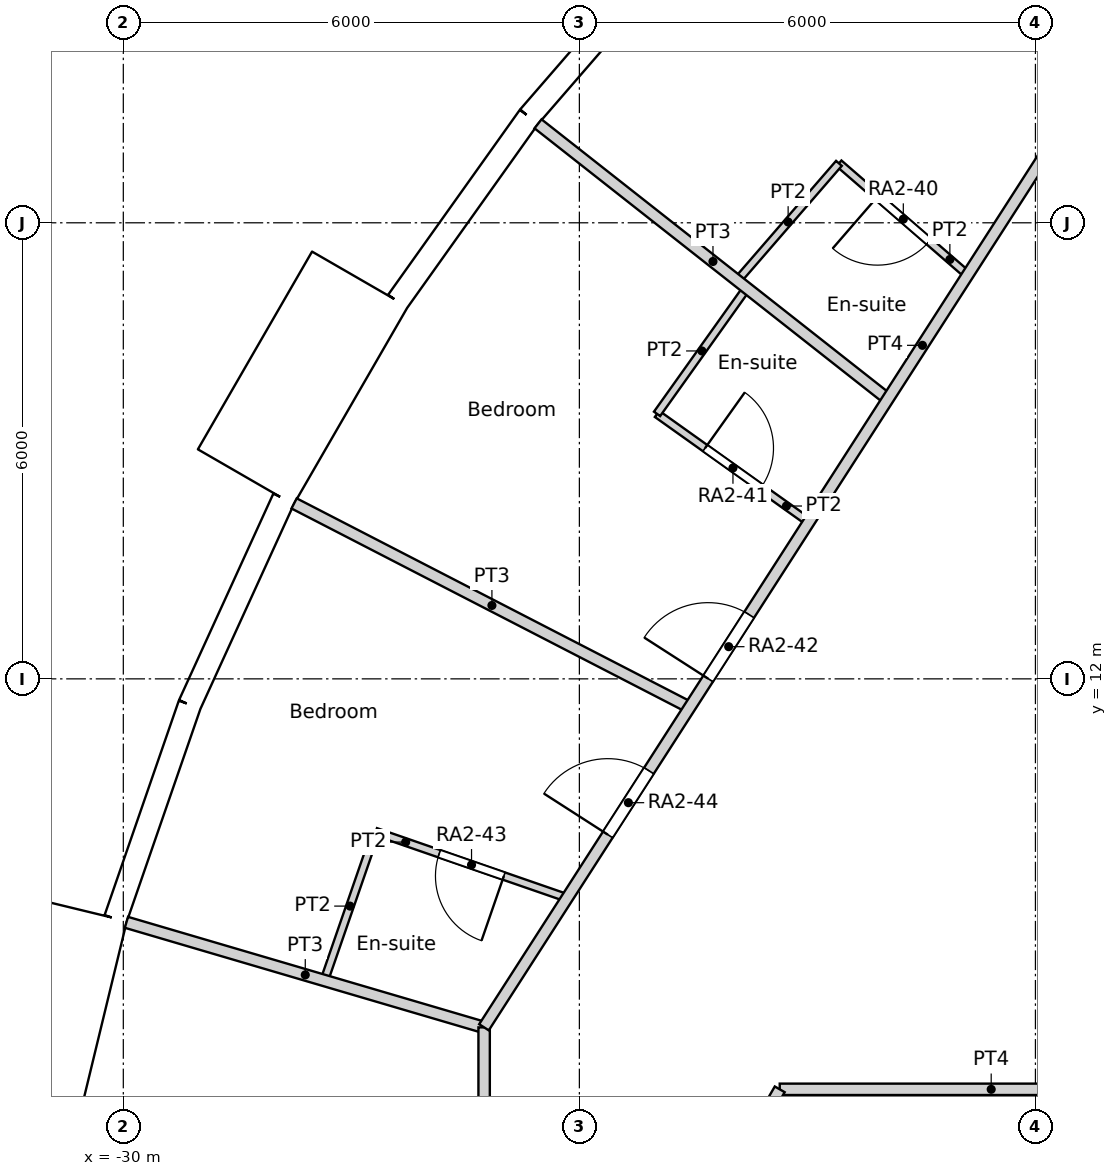
"""IFC4 building model, lengths in metres.
Left out: names, types, materials, properties, quantities, classifications, styles, units other than length and angle.
Written with IfcOpenShell. Run it as: python <this file> out.ifc"""

import sys

from ifc_helpers import new_model, si_unit, direction, frame, frame_2d, origin, origin_2d, place, context, subcontext, project, spatial, rectangle, circle, extrude, element, fill, save


model = new_model("IFC4")
c1 = context("Model", 3, precision=1e-05, world=origin(), true_north=direction((0.0, 1.0)))
c2 = subcontext(c1, "Body", "Model", "MODEL_VIEW")
j1 = project(units=[si_unit("LENGTHUNIT", "METRE"), si_unit("PLANEANGLEUNIT", "RADIAN")], contexts=[c1])
p1 = place(None, origin())
s1 = spatial("IfcSite", under=j1, at=p1, CompositionType="ELEMENT")
p2 = place(p1, origin())
s2 = spatial("IfcBuilding", under=s1, at=p2, CompositionType="ELEMENT")
p3 = place(p2, frame((0.0, 0.0, 39.0)))
s3 = spatial("IfcBuildingStorey", under=s2, at=p3, CompositionType="ELEMENT", Elevation=39.0)
for number, where, z_axis, x_axis in (
    (1, (-23.797, 18.715, 0.0), (0.0, 0.0, 1.0), (1.0, 0.0, 0.0)),
    (2, (-26.909, 13.873, 0.0), (0.0, 0.0, 1.0), (1.0, 0.0, 0.0)),
    (3, (-29.048, 8.529, 0.0), (0.0, 0.0, 1.0), (1.0, 0.0, 0.0)),
):
    element("IfcColumn", number, at=place(p3, frame(where, z_axis=z_axis, x_axis=x_axis)), inside=s3, PredefinedType="COLUMN", context=c2, shape_type="SweptSolid", body=[
        extrude(circle(Radius=0.7, at=origin_2d()), origin(), (0.0, 0.0, 1.0), 3.6),
    ])
for number, where, z_axis, x_axis in (
    (4, (-20.509, 13.489, 0.0), (0.0, 0.0, 1.0), (1.0, 0.0, 0.0)),
    (5, (-23.067, 8.396, 0.0), (0.0, 0.0, 1.0), (1.0, 0.0, 0.0)),
):
    element("IfcColumn", number, at=place(p3, frame(where, z_axis=z_axis, x_axis=x_axis)), inside=s3, PredefinedType="COLUMN", context=c2, shape_type="SweptSolid", body=[
        extrude(circle(Radius=0.75, at=origin_2d()), origin(), (0.0, 0.0, 1.0), 3.6),
    ])
p4 = place(p3, frame((-22.711, 21.646, 0.0), z_axis=(0.0, 0.0, 1.0), x_axis=(-0.654830712471, -0.755775587066, 0.0)))
e6 = element("IfcWall", 6, at=p4, inside=s3, PredefinedType="SOLIDWALL", context=c2, shape_type="SweptSolid", body=[
    extrude(rectangle(XDim=2.98, YDim=0.3, at=frame_2d((1.49, 0.0))), origin(), (0.0, 0.0, 1.0), 3.15),
])
p5 = place(p4, frame((1.49, 0.0, 1.55)))
e7 = element("IfcOpeningElement", 7, at=p5, cuts=e6, PredefinedType="OPENING", context=c2, shape_type="SweptSolid", body=[
    extrude(circle(Radius=0.9, at=origin_2d()), frame((0.0, 0.16, 0.0), z_axis=(0.0, -1.0, 0.0), x_axis=(1.0, 0.0, 0.0)), (0.0, 0.0, 1.0), 0.32),
])
p6 = place(p3, frame((-24.662, 19.394, 0.0), z_axis=(0.0, 0.0, 1.0), x_axis=(-0.580113774115, -0.814535456, 0.0)))
e8 = element("IfcWall", 8, at=p6, inside=s3, PredefinedType="SOLIDWALL", context=c2, shape_type="SweptSolid", body=[
    extrude(rectangle(XDim=2.98, YDim=0.3, at=frame_2d((1.49, 0.0))), origin(), (0.0, 0.0, 1.0), 3.15),
])
p7 = place(p6, frame((1.49, 0.0, 1.55)))
e9 = element("IfcOpeningElement", 9, at=p7, cuts=e8, PredefinedType="OPENING", context=c2, shape_type="SweptSolid", body=[
    extrude(circle(Radius=0.9, at=origin_2d()), frame((0.0, 0.16, 0.0), z_axis=(0.0, -1.0, 0.0), x_axis=(1.0, 0.0, 0.0)), (0.0, 0.0, 1.0), 0.32),
])
p8 = place(p3, frame((-26.888, 17.256, -0.45), z_axis=(0.0, 0.0, 1.0), x_axis=(-0.499990139034, -0.866031096941, 0.0)))
e10 = element("IfcWall", 10, at=p8, inside=s3, PredefinedType="ELEMENTEDWALL", context=c2, shape_type="SweptSolid", body=[
    extrude(rectangle(XDim=3.0, YDim=1.45, at=frame_2d((1.5, 0.0))), origin(), (0.0, 0.0, 1.0), 3.6),
])
p9 = place(p8, frame((1.5, 0.0, 2.0)))
e11 = element("IfcOpeningElement", 11, at=p9, cuts=e10, PredefinedType="OPENING", context=c2, shape_type="SweptSolid", body=[
    extrude(circle(Radius=0.9, at=origin_2d()), frame((0.0, 0.735, 0.0), z_axis=(0.0, -1.0, 0.0), x_axis=(1.0, 0.0, 0.0)), (0.0, 0.0, 1.0), 1.47),
])
p10 = place(p3, frame((-27.889, 14.371, 0.0), z_axis=(0.0, 0.0, 1.0), x_axis=(-0.415407317162, -0.909635509888, 0.0)))
e12 = element("IfcWall", 12, at=p10, inside=s3, PredefinedType="SOLIDWALL", context=c2, shape_type="SweptSolid", body=[
    extrude(rectangle(XDim=2.98, YDim=0.3, at=frame_2d((1.49, 0.0))), origin(), (0.0, 0.0, 1.0), 3.15),
])
p11 = place(p10, frame((1.49, 0.0, 1.55)))
e13 = element("IfcOpeningElement", 13, at=p11, cuts=e12, PredefinedType="OPENING", context=c2, shape_type="SweptSolid", body=[
    extrude(circle(Radius=0.9, at=origin_2d()), frame((0.0, 0.16, 0.0), z_axis=(0.0, -1.0, 0.0), x_axis=(1.0, 0.0, 0.0)), (0.0, 0.0, 1.0), 0.32),
])
p12 = place(p3, frame((-29.127, 11.661, 0.0), z_axis=(0.0, 0.0, 1.0), x_axis=(-0.327096492592, -0.944990944154, 0.0)))
e14 = element("IfcWall", 14, at=p12, inside=s3, PredefinedType="SOLIDWALL", context=c2, shape_type="SweptSolid", body=[
    extrude(rectangle(XDim=2.979, YDim=0.3, at=frame_2d((1.49, 0.0))), origin(), (0.0, 0.0, 1.0), 3.15),
])
p13 = place(p12, frame((1.49, 0.0, 1.55)))
e15 = element("IfcOpeningElement", 15, at=p13, cuts=e14, PredefinedType="OPENING", context=c2, shape_type="SweptSolid", body=[
    extrude(circle(Radius=0.9, at=origin_2d()), frame((0.0, 0.16, 0.0), z_axis=(0.0, -1.0, 0.0), x_axis=(1.0, 0.0, 0.0)), (0.0, 0.0, 1.0), 0.32),
])
p14 = place(p3, frame((-30.661, 8.982, -0.45), z_axis=(0.0, 0.0, 1.0), x_axis=(-0.235751415068, -0.971813392732, 0.0)))
e16 = element("IfcWall", 16, at=p14, inside=s3, PredefinedType="ELEMENTEDWALL", context=c2, shape_type="SweptSolid", body=[
    extrude(rectangle(XDim=3.0, YDim=1.45, at=frame_2d((1.5, 0.0))), origin(), (0.0, 0.0, 1.0), 3.6),
])
p15 = place(p14, frame((1.5, 0.0, 2.0)))
e17 = element("IfcOpeningElement", 17, at=p15, cuts=e16, PredefinedType="OPENING", context=c2, shape_type="SweptSolid", body=[
    extrude(circle(Radius=0.9, at=origin_2d()), frame((0.0, 0.735, 0.0), z_axis=(0.0, -1.0, 0.0), x_axis=(1.0, 0.0, 0.0)), (0.0, 0.0, 1.0), 1.47),
])
p16 = place(p3, frame((-25.255, 7.416, 0.0), z_axis=(0.0, 0.0, 1.0), x_axis=(0.540805851332, 0.841147449123, 0.0)))
e18 = element("IfcWall", 18, at=p16, inside=s3, PredefinedType="PARTITIONING", context=c2, shape_type="SweptSolid", body=[
    extrude(rectangle(XDim=14.829, YDim=0.15, at=frame_2d((7.415, 0.0))), origin(), (0.0, 0.0, 1.0), 3.15),
])
p17 = place(p16, frame((5.453, 0.0, 0.0)))
e19 = element("IfcOpeningElement", 19, at=p17, cuts=e18, PredefinedType="OPENING", context=c2, shape_type="SweptSolid", body=[
    extrude(rectangle(XDim=1.0, YDim=2.1, at=frame_2d((0.5, 1.05))), frame((0.0, 0.075, 0.0), z_axis=(0.0, -1.0, 0.0), x_axis=(1.0, 0.0, 0.0)), (0.0, 0.0, 1.0), 0.15),
])
p18 = place(p16, frame((3.013, 0.0, 0.0)))
e20 = element("IfcOpeningElement", 20, at=p18, cuts=e18, PredefinedType="OPENING", context=c2, shape_type="SweptSolid", body=[
    extrude(rectangle(XDim=1.0, YDim=2.1, at=frame_2d((0.5, 1.05))), frame((0.0, 0.075, 0.0), z_axis=(0.0, -1.0, 0.0), x_axis=(1.0, 0.0, 0.0)), (0.0, 0.0, 1.0), 0.15),
])
p19 = place(p3, frame((-21.364, 6.6, 0.0), z_axis=(0.0, 0.0, 1.0), x_axis=(1.0, 0.0, 0.0)))
e21 = element("IfcWall", 21, at=p19, inside=s3, PredefinedType="PARTITIONING", context=c2, shape_type="SweptSolid", body=[
    extrude(rectangle(XDim=5.564, YDim=0.15, at=frame_2d((2.782, 0.0))), origin(), (0.0, 0.0, 1.0), 3.15),
])
p20 = place(p3, frame((-21.802, 5.842, 0.0), z_axis=(0.0, 0.0, 1.0), x_axis=(0.500277597875, 0.865865073245, 0.0)))
e22 = element("IfcWall", 22, at=p20, inside=s3, PredefinedType="PARTITIONING", context=c2, shape_type="SweptSolid", body=[
    extrude(rectangle(XDim=0.875, YDim=0.15, at=frame_2d((0.438, 0.0))), origin(), (0.0, 0.0, 1.0), 3.15),
])
p21 = place(p3, frame((-25.253, -7.415, 0.0), z_axis=(0.0, 0.0, 1.0), x_axis=(0.0, 1.0, 0.0)))
e23 = element("IfcWall", 23, at=p21, inside=s3, PredefinedType="PARTITIONING", context=c2, shape_type="SweptSolid", body=[
    extrude(rectangle(XDim=14.83, YDim=0.15, at=frame_2d((7.415, 0.0))), origin(), (0.0, 0.0, 1.0), 3.15),
])
p22 = place(p21, frame((8.165, 0.0, 0.0)))
e24 = element("IfcOpeningElement", 24, at=p22, cuts=e23, PredefinedType="OPENING", context=c2, shape_type="SweptSolid", body=[
    extrude(rectangle(XDim=1.0, YDim=2.04, at=frame_2d((0.5, 1.02))), frame((0.0, 0.075, 0.0), z_axis=(0.0, -1.0, 0.0), x_axis=(1.0, 0.0, 0.0)), (0.0, 0.0, 1.0), 0.15),
])
p23 = place(p21, frame((2.004, 0.0, 0.0)))
e25 = element("IfcOpeningElement", 25, at=p23, cuts=e23, PredefinedType="OPENING", context=c2, shape_type="SweptSolid", body=[
    extrude(rectangle(XDim=1.0, YDim=2.04, at=frame_2d((0.5, 1.02))), frame((0.0, 0.075, 0.0), z_axis=(0.0, -1.0, 0.0), x_axis=(1.0, 0.0, 0.0)), (0.0, 0.0, 1.0), 0.15),
])
p24 = place(p3, frame((-20.448, 23.598, 0.0), z_axis=(0.0, 0.0, 1.0), x_axis=(0.654847179409, -0.755761319214, 0.0)))
e26 = element("IfcWall", 26, at=p24, inside=s3, PredefinedType="PARTITIONING", context=c2, shape_type="SweptSolid", body=[
    extrude(rectangle(XDim=4.906, YDim=0.1, at=frame_2d((2.453, 0.0))), origin(), (0.0, 0.0, 1.0), 3.15),
])
p25 = place(p24, frame((2.272, 0.0, 0.0)))
e27 = element("IfcOpeningElement", 27, at=p25, cuts=e26, PredefinedType="OPENING", context=c2, shape_type="SweptSolid", body=[
    extrude(rectangle(XDim=0.9, YDim=2.1, at=frame_2d((0.45, 1.05))), frame((0.0, 0.05, 0.0), z_axis=(0.0, -1.0, 0.0), x_axis=(1.0, 0.0, 0.0)), (0.0, 0.0, 1.0), 0.1),
])
p26 = place(p3, frame((-20.585, 18.782, 0.0), z_axis=(0.0, 0.0, 1.0), x_axis=(0.755685488978, -0.6549346851, 0.0)))
e28 = element("IfcWall", 28, at=p26, inside=s3, PredefinedType="PARTITIONING", context=c2, shape_type="SweptSolid", body=[
    extrude(rectangle(XDim=2.241, YDim=0.1, at=frame_2d((1.121, 0.0))), origin(), (0.0, 0.0, 1.0), 3.15),
])
p27 = place(p26, frame((0.671, 0.0, 0.0)))
e29 = element("IfcOpeningElement", 29, at=p27, cuts=e28, PredefinedType="OPENING", context=c2, shape_type="SweptSolid", body=[
    extrude(rectangle(XDim=0.9, YDim=2.04, at=frame_2d((0.45, 1.02))), frame((0.0, 0.05, 0.0), z_axis=(0.0, -1.0, 0.0), x_axis=(1.0, 0.0, 0.0)), (0.0, 0.0, 1.0), 0.1),
])
p28 = place(p3, frame((-21.922, 17.239, 0.0), z_axis=(0.0, 0.0, 1.0), x_axis=(0.654907776539, 0.755708809152, 0.0)))
e30 = element("IfcWall", 30, at=p28, inside=s3, PredefinedType="PARTITIONING", context=c2, shape_type="SweptSolid", body=[
    extrude(rectangle(XDim=2.042, YDim=0.1, at=frame_2d((1.021, 0.0))), origin(), (0.0, 0.0, 1.0), 3.15),
])
p29 = place(p3, frame((-24.544, 19.302, 0.0), z_axis=(0.0, 0.0, 1.0), x_axis=(0.785905950196, -0.618346049916, 0.0)))
e31 = element("IfcWall", 31, at=p29, inside=s3, PredefinedType="PARTITIONING", context=c2, shape_type="SweptSolid", body=[
    extrude(rectangle(XDim=5.857, YDim=0.15, at=frame_2d((2.929, 0.0))), origin(), (0.0, 0.0, 1.0), 3.15),
])
p30 = place(p3, frame((-22.978, 15.486, 0.0), z_axis=(0.0, 0.0, 1.0), x_axis=(0.580283748447, 0.814414373208, 0.0)))
e32 = element("IfcWall", 32, at=p30, inside=s3, PredefinedType="PARTITIONING", context=c2, shape_type="SweptSolid", body=[
    extrude(rectangle(XDim=2.033, YDim=0.1, at=frame_2d((1.017, 0.0))), origin(), (0.0, 0.0, 1.0), 3.15),
])
p31 = place(p3, frame((-22.978, 15.486, 0.0), z_axis=(0.0, 0.0, 1.0), x_axis=(0.814519517834, -0.580136152181, 0.0)))
e33 = element("IfcWall", 33, at=p31, inside=s3, PredefinedType="PARTITIONING", context=c2, shape_type="SweptSolid", body=[
    extrude(rectangle(XDim=2.453, YDim=0.1, at=frame_2d((1.227, 0.0))), origin(), (0.0, 0.0, 1.0), 3.15),
])
p32 = place(p31, frame((0.776, 0.0, 0.0)))
e34 = element("IfcOpeningElement", 34, at=p32, cuts=e33, PredefinedType="OPENING", context=c2, shape_type="SweptSolid", body=[
    extrude(rectangle(XDim=0.9, YDim=2.04, at=frame_2d((0.45, 1.02))), frame((0.0, 0.05, 0.0), z_axis=(0.0, -1.0, 0.0), x_axis=(1.0, 0.0, 0.0)), (0.0, 0.0, 1.0), 0.1),
])
p33 = place(p3, frame((-27.753, 14.308, 0.0), z_axis=(0.0, 0.0, 1.0), x_axis=(0.88877955153, -0.45833493079, 0.0)))
e35 = element("IfcWall", 35, at=p33, inside=s3, PredefinedType="PARTITIONING", context=c2, shape_type="SweptSolid", body=[
    extrude(rectangle(XDim=5.856, YDim=0.15, at=frame_2d((2.928, 0.0))), origin(), (0.0, 0.0, 1.0), 3.15),
])
p34 = place(p3, frame((-26.679, 9.989, 0.0), z_axis=(0.0, 0.0, 1.0), x_axis=(0.945014370431, -0.327028805578, 0.0)))
e36 = element("IfcWall", 36, at=p34, inside=s3, PredefinedType="PARTITIONING", context=c2, shape_type="SweptSolid", body=[
    extrude(rectangle(XDim=2.667, YDim=0.1, at=frame_2d((1.333, 0.0))), origin(), (0.0, 0.0, 1.0), 3.15),
])
p35 = place(p34, frame((0.884, 0.0, 0.0)))
e37 = element("IfcOpeningElement", 37, at=p35, cuts=e36, PredefinedType="OPENING", context=c2, shape_type="SweptSolid", body=[
    extrude(rectangle(XDim=0.9, YDim=2.04, at=frame_2d((0.45, 1.02))), frame((0.0, 0.05, 0.0), z_axis=(0.0, -1.0, 0.0), x_axis=(1.0, 0.0, 0.0)), (0.0, 0.0, 1.0), 0.1),
])
p36 = place(p3, frame((-27.356, 8.032, 0.0), z_axis=(0.0, 0.0, 1.0), x_axis=(0.326924291943, 0.945050531632, 0.0)))
e38 = element("IfcWall", 38, at=p36, inside=s3, PredefinedType="PARTITIONING", context=c2, shape_type="SweptSolid", body=[
    extrude(rectangle(XDim=2.071, YDim=0.1, at=frame_2d((1.035, 0.0))), origin(), (0.0, 0.0, 1.0), 3.15),
])
p37 = place(p3, frame((-29.959, 8.797, 0.0), z_axis=(0.0, 0.0, 1.0), x_axis=(0.95941700717, -0.281991145876, 0.0)))
e39 = element("IfcWall", 39, at=p37, inside=s3, PredefinedType="PARTITIONING", context=c2, shape_type="SweptSolid", body=[
    extrude(rectangle(XDim=4.905, YDim=0.15, at=frame_2d((2.452, 0.0))), origin(), (0.0, 0.0, 1.0), 3.15),
])
p38 = place(p5, origin())
e40 = element("IfcWindow", 40, at=p38, inside=s3, PartitioningType="SINGLE_PANEL", PredefinedType="WINDOW", context=c2, shape_type="SweptSolid", body=[
    extrude(circle(Radius=0.9, at=origin_2d()), frame((0.0, 0.12, 0.0), z_axis=(0.0, -1.0, 0.0), x_axis=(1.0, 0.0, 0.0)), (0.0, 0.0, 1.0), 0.1),
])
fill(e7, e40)
p39 = place(p7, origin())
e41 = element("IfcWindow", 41, at=p39, inside=s3, PartitioningType="SINGLE_PANEL", PredefinedType="WINDOW", context=c2, shape_type="SweptSolid", body=[
    extrude(circle(Radius=0.9, at=origin_2d()), frame((0.0, 0.12, 0.0), z_axis=(0.0, -1.0, 0.0), x_axis=(1.0, 0.0, 0.0)), (0.0, 0.0, 1.0), 0.1),
])
fill(e9, e41)
p40 = place(p9, origin())
e42 = element("IfcWindow", 42, at=p40, inside=s3, PartitioningType="SINGLE_PANEL", PredefinedType="WINDOW", context=c2, shape_type="SweptSolid", body=[
    extrude(circle(Radius=0.9, at=origin_2d()), frame((0.0, 0.695, 0.0), z_axis=(0.0, -1.0, 0.0), x_axis=(1.0, 0.0, 0.0)), (0.0, 0.0, 1.0), 0.1),
])
fill(e11, e42)
p41 = place(p11, origin())
e43 = element("IfcWindow", 43, at=p41, inside=s3, PartitioningType="SINGLE_PANEL", PredefinedType="WINDOW", context=c2, shape_type="SweptSolid", body=[
    extrude(circle(Radius=0.9, at=origin_2d()), frame((0.0, 0.12, 0.0), z_axis=(0.0, -1.0, 0.0), x_axis=(1.0, 0.0, 0.0)), (0.0, 0.0, 1.0), 0.1),
])
fill(e13, e43)
p42 = place(p13, origin())
e44 = element("IfcWindow", 44, at=p42, inside=s3, PartitioningType="SINGLE_PANEL", PredefinedType="WINDOW", context=c2, shape_type="SweptSolid", body=[
    extrude(circle(Radius=0.9, at=origin_2d()), frame((0.0, 0.12, 0.0), z_axis=(0.0, -1.0, 0.0), x_axis=(1.0, 0.0, 0.0)), (0.0, 0.0, 1.0), 0.1),
])
fill(e15, e44)
p43 = place(p15, origin())
e45 = element("IfcWindow", 45, at=p43, inside=s3, PartitioningType="SINGLE_PANEL", PredefinedType="WINDOW", context=c2, shape_type="SweptSolid", body=[
    extrude(circle(Radius=0.9, at=origin_2d()), frame((0.0, 0.695, 0.0), z_axis=(0.0, -1.0, 0.0), x_axis=(1.0, 0.0, 0.0)), (0.0, 0.0, 1.0), 0.1),
])
fill(e17, e45)
p44 = place(p27, origin())
e46 = element("IfcDoor", 46, at=p44, inside=s3, OperationType="SINGLE_SWING_RIGHT", PredefinedType="DOOR", context=c2, shape_type="SweptSolid", body=[
    extrude(rectangle(XDim=0.9, YDim=2.04, at=frame_2d((0.45, 1.02))), frame((0.0, 0.025, 0.0), z_axis=(0.0, -1.0, 0.0), x_axis=(1.0, 0.0, 0.0)), (0.0, 0.0, 1.0), 0.05),
])
fill(e29, e46)
p45 = place(p32, origin())
e47 = element("IfcDoor", 47, at=p45, inside=s3, OperationType="SINGLE_SWING_LEFT", PredefinedType="DOOR", context=c2, shape_type="SweptSolid", body=[
    extrude(rectangle(XDim=0.9, YDim=2.04, at=frame_2d((0.45, 1.02))), frame((0.0, 0.025, 0.0), z_axis=(0.0, -1.0, 0.0), x_axis=(1.0, 0.0, 0.0)), (0.0, 0.0, 1.0), 0.05),
])
fill(e34, e47)
p46 = place(p17, origin())
e48 = element("IfcDoor", 48, at=p46, inside=s3, OperationType="SINGLE_SWING_LEFT", PredefinedType="DOOR", context=c2, shape_type="SweptSolid", body=[
    extrude(rectangle(XDim=1.0, YDim=2.1, at=frame_2d((0.5, 1.05))), frame((0.0, 0.025, 0.0), z_axis=(0.0, -1.0, 0.0), x_axis=(1.0, 0.0, 0.0)), (0.0, 0.0, 1.0), 0.05),
])
fill(e19, e48)
p47 = place(p35, origin())
e49 = element("IfcDoor", 49, at=p47, inside=s3, OperationType="SINGLE_SWING_LEFT", PredefinedType="DOOR", context=c2, shape_type="SweptSolid", body=[
    extrude(rectangle(XDim=0.9, YDim=2.04, at=frame_2d((0.45, 1.02))), frame((0.0, 0.025, 0.0), z_axis=(0.0, -1.0, 0.0), x_axis=(1.0, 0.0, 0.0)), (0.0, 0.0, 1.0), 0.05),
])
fill(e37, e49)
p48 = place(p18, origin())
e50 = element("IfcDoor", 50, at=p48, inside=s3, OperationType="SINGLE_SWING_LEFT", PredefinedType="DOOR", context=c2, shape_type="SweptSolid", body=[
    extrude(rectangle(XDim=1.0, YDim=2.1, at=frame_2d((0.5, 1.05))), frame((0.0, 0.025, 0.0), z_axis=(0.0, -1.0, 0.0), x_axis=(1.0, 0.0, 0.0)), (0.0, 0.0, 1.0), 0.05),
])
fill(e20, e50)
save(model, sys.argv[1])
